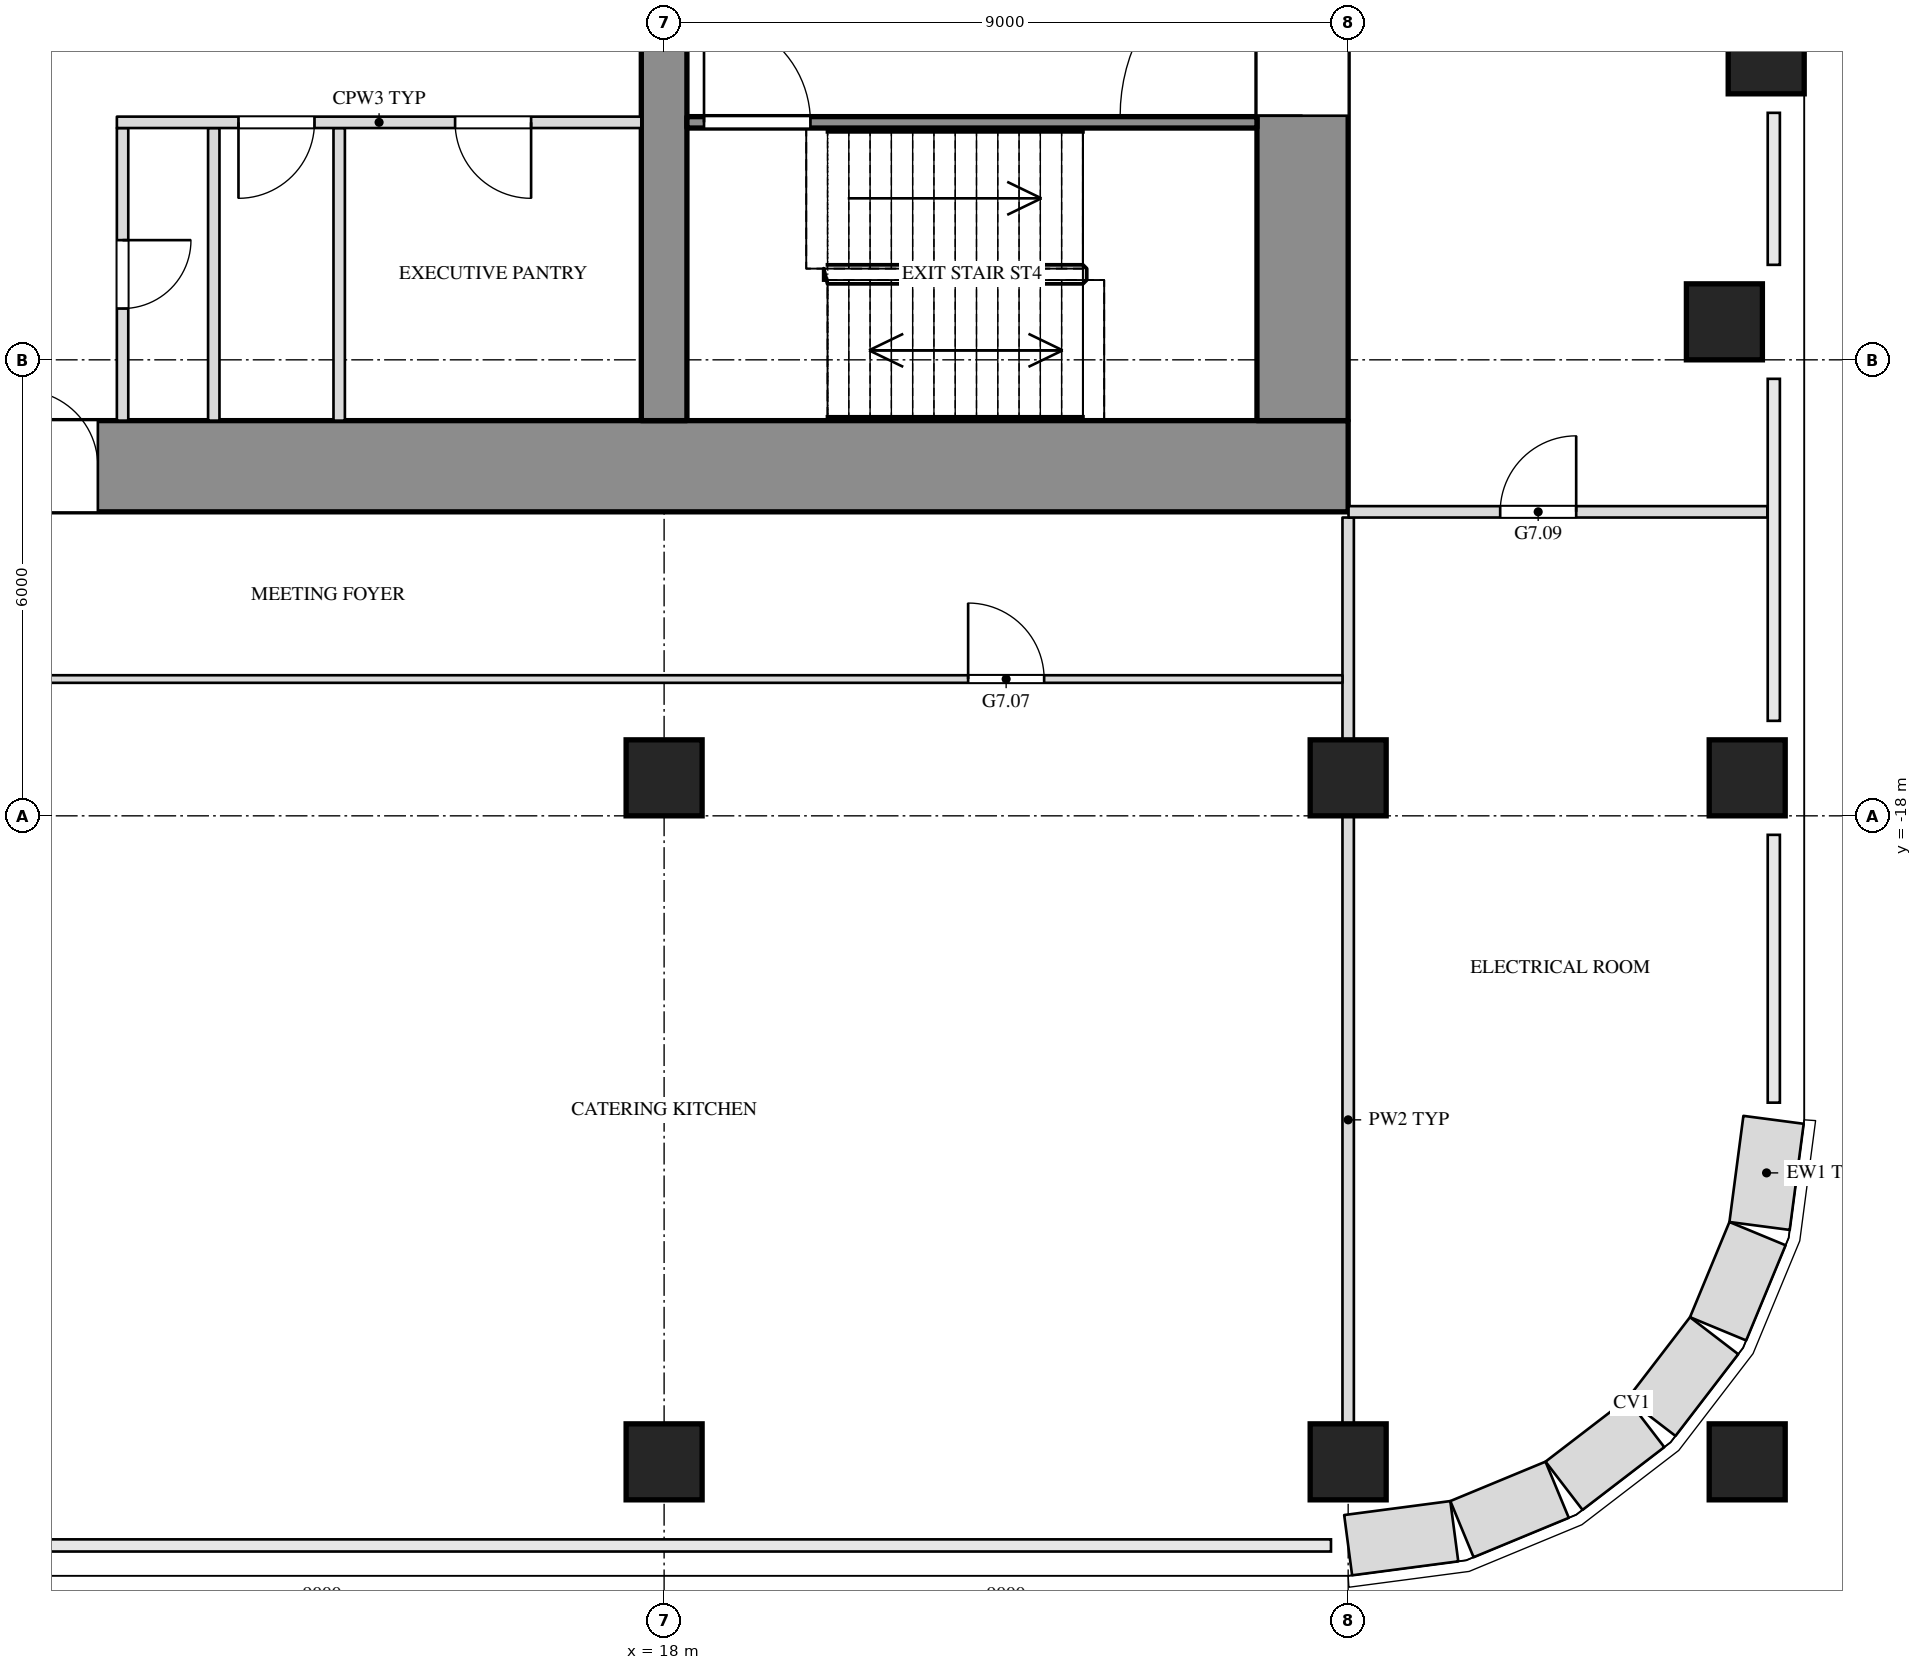
"""IFC4 building model, lengths in metres.
Left out: names, types, materials, properties, quantities, classifications, styles, units other than length and angle.
Written with IfcOpenShell. Run it as: python <this file> out.ifc"""

import sys

from ifc_helpers import new_model, si_unit, direction, frame, frame_2d, origin, origin_2d, place, context, subcontext, project, spatial, rectangle, extrude, element, fill, save


model = new_model("IFC4")
c1 = context("Model", 3, precision=1e-05, world=origin(), true_north=direction((0.0, 1.0)))
c2 = subcontext(c1, "Body", "Model", "MODEL_VIEW")
j1 = project(units=[si_unit("LENGTHUNIT", "METRE"), si_unit("PLANEANGLEUNIT", "RADIAN")], contexts=[c1])
p1 = place(None, origin())
s1 = spatial("IfcSite", under=j1, at=p1, CompositionType="ELEMENT")
p2 = place(p1, origin())
s2 = spatial("IfcBuilding", under=s1, at=p2, CompositionType="ELEMENT")
p3 = place(p2, frame((0.0, 0.0, 43.5)))
s3 = spatial("IfcBuildingStorey", under=s2, at=p3, CompositionType="ELEMENT", Elevation=43.5)
for number, where, z_axis, x_axis in (
    (1, (18.0, -26.5, 0.0), (0.0, 0.0, 1.0), (1.0, 0.0, 0.0)),
    (2, (27.0, -26.5, 0.0), (0.0, 0.0, 1.0), (1.0, 0.0, 0.0)),
    (3, (32.25, -26.5, 0.0), (0.0, 0.0, 1.0), (1.0, 0.0, 0.0)),
    (4, (18.0, -17.5, 0.0), (0.0, 0.0, 1.0), (1.0, 0.0, 0.0)),
    (5, (27.0, -17.5, 0.0), (0.0, 0.0, 1.0), (1.0, 0.0, 0.0)),
    (6, (32.25, -17.5, 0.0), (0.0, 0.0, 1.0), (1.0, 0.0, 0.0)),
    (7, (31.95, -11.5, 0.0), (0.0, 0.0, 1.0), (1.0, 0.0, 0.0)),
    (8, (32.5, -8.0, 0.0), (0.0, 0.0, 1.0), (1.0, 0.0, 0.0)),
):
    element("IfcColumn", number, at=place(p3, frame(where, z_axis=z_axis, x_axis=x_axis)), inside=s3, PredefinedType="COLUMN", context=c2, shape_type="SweptSolid", body=[
        extrude(rectangle(XDim=1.0, YDim=1.0, at=origin_2d()), origin(), (0.0, 0.0, 1.0), 4.5),
    ])
p4 = place(p3, frame((-27.0, -13.4, 0.0), z_axis=(0.0, 0.0, 1.0), x_axis=(1.0, 0.0, 0.0)))
e9 = element("IfcWall", 9, at=p4, inside=s3, PredefinedType="SHEAR", context=c2, shape_type="SweptSolid", body=[
    extrude(rectangle(XDim=54.0, YDim=1.2, at=frame_2d((27.0, 0.0))), origin(), (0.0, 0.0, 1.0), 4.25),
])
p5 = place(p4, frame((16.45, 0.0, 0.0)))
e10 = element("IfcOpeningElement", 10, at=p5, cuts=e9, PredefinedType="OPENING", context=c2, shape_type="SweptSolid", body=[
    extrude(rectangle(XDim=1.0, YDim=2.1, at=frame_2d((0.5, 1.05))), frame((0.0, 0.612, 0.0), z_axis=(0.0, -1.0, 0.0), x_axis=(1.0, 0.0, 0.0)), (0.0, 0.0, 1.0), 1.224),
])
p6 = place(p4, frame((36.55, 0.0, 0.0)))
e11 = element("IfcOpeningElement", 11, at=p6, cuts=e9, PredefinedType="OPENING", context=c2, shape_type="SweptSolid", body=[
    extrude(rectangle(XDim=1.0, YDim=2.1, at=frame_2d((0.5, 1.05))), frame((0.0, 0.612, 0.0), z_axis=(0.0, -1.0, 0.0), x_axis=(1.0, 0.0, 0.0)), (0.0, 0.0, 1.0), 1.224),
])
p7 = place(p3, frame((26.4, -12.8, 0.0), z_axis=(0.0, 0.0, 1.0), x_axis=(0.0, 1.0, 0.0)))
e12 = element("IfcWall", 12, at=p7, inside=s3, PredefinedType="SHEAR", context=c2, shape_type="SweptSolid", body=[
    extrude(rectangle(XDim=9.6, YDim=1.2, at=frame_2d((4.8, 0.0))), origin(), (0.0, 0.0, 1.0), 4.25),
])
p8 = place(p7, frame((4.012, 0.0, 0.0)))
e13 = element("IfcOpeningElement", 13, at=p8, cuts=e12, PredefinedType="OPENING", context=c2, shape_type="SweptSolid", body=[
    extrude(rectangle(XDim=2.4, YDim=2.1, at=frame_2d((1.2, 1.05))), frame((0.0, 0.612, 0.0), z_axis=(0.0, -1.0, 0.0), x_axis=(1.0, 0.0, 0.0)), (0.0, 0.0, 1.0), 1.224),
])
p9 = place(p3, frame((18.0, -12.8, 0.0), z_axis=(0.0, 0.0, 1.0), x_axis=(0.0, 1.0, 0.0)))
e14 = element("IfcWall", 14, at=p9, inside=s3, PredefinedType="SHEAR", context=c2, shape_type="SweptSolid", body=[
    extrude(rectangle(XDim=9.6, YDim=0.6, at=frame_2d((4.8, 0.0))), origin(), (0.0, 0.0, 1.0), 4.25),
])
p10 = place(p3, frame((27.0, -26.0, 0.0), z_axis=(0.0, 0.0, 1.0), x_axis=(0.0, 1.0, 0.0)))
e15 = element("IfcWall", 15, at=p10, inside=s3, PredefinedType="PARTITIONING", context=c2, shape_type="SweptSolid", body=[
    extrude(rectangle(XDim=8.0, YDim=0.15, at=frame_2d((4.0, 0.0))), origin(), (0.0, 0.0, 1.0), 3.638),
])
p11 = place(p3, frame((27.0, -17.0, 0.0), z_axis=(0.0, 0.0, 1.0), x_axis=(0.0, 1.0, 0.0)))
e16 = element("IfcWall", 16, at=p11, inside=s3, PredefinedType="PARTITIONING", context=c2, shape_type="SweptSolid", body=[
    extrude(rectangle(XDim=2.925, YDim=0.15, at=frame_2d((1.462, 0.0))), origin(), (0.0, 0.0, 1.0), 3.638),
])
p12 = place(p3, frame((8.9, -16.2, 0.0), z_axis=(0.0, 0.0, 1.0), x_axis=(1.0, 0.0, 0.0)))
e17 = element("IfcWall", 17, at=p12, inside=s3, PredefinedType="PARTITIONING", context=c2, shape_type="SweptSolid", body=[
    extrude(rectangle(XDim=18.025, YDim=0.1, at=frame_2d((9.013, 0.0))), origin(), (0.0, 0.0, 1.0), 4.25),
])
p13 = place(p12, frame((13.1, 0.0, 0.0)))
e18 = element("IfcOpeningElement", 18, at=p13, cuts=e17, PredefinedType="OPENING", context=c2, shape_type="SweptSolid", body=[
    extrude(rectangle(XDim=1.0, YDim=2.1, at=frame_2d((0.5, 1.05))), frame((0.0, 0.062, 0.0), z_axis=(0.0, -1.0, 0.0), x_axis=(1.0, 0.0, 0.0)), (0.0, 0.0, 1.0), 0.124),
])
p14 = place(p3, frame((27.005, -14.0, 0.0), z_axis=(0.0, 0.0, 1.0), x_axis=(1.0, 0.0, 0.0)))
e19 = element("IfcWall", 19, at=p14, inside=s3, PredefinedType="PARTITIONING", context=c2, shape_type="SweptSolid", body=[
    extrude(rectangle(XDim=5.511, YDim=0.15, at=frame_2d((2.756, 0.0))), origin(), (0.0, 0.0, 1.0), 4.25),
])
p15 = place(p14, frame((1.995, 0.0, 0.0)))
e20 = element("IfcOpeningElement", 20, at=p15, cuts=e19, PredefinedType="OPENING", context=c2, shape_type="SweptSolid", body=[
    extrude(rectangle(XDim=1.0, YDim=2.1, at=frame_2d((0.5, 1.05))), frame((0.0, 0.087, 0.0), z_axis=(0.0, -1.0, 0.0), x_axis=(1.0, 0.0, 0.0)), (0.0, 0.0, 1.0), 0.174),
])
p16 = place(p3, frame((27.0, -27.597, 0.0), z_axis=(0.0, 0.0, 1.0), x_axis=(0.99144603414, 0.130517283865, 0.0)))
e21 = element("IfcWall", 21, at=p16, inside=s3, PredefinedType="SOLIDWALL", context=c2, shape_type="SweptSolid", body=[
    extrude(rectangle(XDim=1.408, YDim=0.8, at=frame_2d((0.704, 0.0))), origin(), (0.0, 0.0, 1.0), 4.25),
])
p17 = place(p3, frame((28.497, -27.386, 0.0), z_axis=(0.0, 0.0, 1.0), x_axis=(0.923847774587, 0.38276009378, 0.0)))
e22 = element("IfcWall", 22, at=p17, inside=s3, PredefinedType="SOLIDWALL", context=c2, shape_type="SweptSolid", body=[
    extrude(rectangle(XDim=1.355, YDim=0.8, at=frame_2d((0.678, 0.0))), origin(), (0.0, 0.0, 1.0), 4.25),
])
for number, where, z_axis, x_axis in (
    (23, (29.84, -26.815, 0.0), (0.0, 0.0, 1.0), (0.793, 0.609, 0.0)),
    (24, (30.989, -25.916, 0.0), (0.0, 0.0, 1.0), (0.609, 0.793, 0.0)),
):
    element("IfcWall", number, at=place(p3, frame(where, z_axis=z_axis, x_axis=x_axis)), inside=s3, PredefinedType="SOLIDWALL", context=c2, shape_type="SweptSolid", body=[
        extrude(rectangle(XDim=1.356, YDim=0.8, at=frame_2d((0.678, 0.0))), origin(), (0.0, 0.0, 1.0), 4.25),
    ])
p18 = place(p3, frame((31.867, -24.75, 0.0), z_axis=(0.0, 0.0, 1.0), x_axis=(0.38276009378, 0.923847774587, 0.0)))
e25 = element("IfcWall", 25, at=p18, inside=s3, PredefinedType="SOLIDWALL", context=c2, shape_type="SweptSolid", body=[
    extrude(rectangle(XDim=1.355, YDim=0.8, at=frame_2d((0.678, 0.0))), origin(), (0.0, 0.0, 1.0), 4.25),
])
p19 = place(p3, frame((32.413, -23.396, 0.0), z_axis=(0.0, 0.0, 1.0), x_axis=(0.130517283865, 0.99144603414, 0.0)))
e26 = element("IfcWall", 26, at=p19, inside=s3, PredefinedType="SOLIDWALL", context=c2, shape_type="SweptSolid", body=[
    extrude(rectangle(XDim=1.408, YDim=0.8, at=frame_2d((0.704, 0.0))), origin(), (0.0, 0.0, 1.0), 4.25),
])
p20 = place(p3, frame((10.875, -12.8, 0.0), z_axis=(0.0, 0.0, 1.0), x_axis=(0.0, 1.0, 0.0)))
e27 = element("IfcWall", 27, at=p20, inside=s3, PredefinedType="PARTITIONING", context=c2, shape_type="SweptSolid", body=[
    extrude(rectangle(XDim=3.85, YDim=0.15, at=frame_2d((1.925, 0.0))), origin(), (0.0, 0.0, 1.0), 4.25),
])
p21 = place(p20, frame((1.475, 0.0, 0.0)))
e28 = element("IfcOpeningElement", 28, at=p21, cuts=e27, PredefinedType="OPENING", context=c2, shape_type="SweptSolid", body=[
    extrude(rectangle(XDim=0.9, YDim=2.1, at=frame_2d((0.45, 1.05))), frame((0.0, 0.087, 0.0), z_axis=(0.0, -1.0, 0.0), x_axis=(1.0, 0.0, 0.0)), (0.0, 0.0, 1.0), 0.174),
])
for number, where, z_axis, x_axis in (
    (29, (12.075, -12.8, 0.0), (0.0, 0.0, 1.0), (0.0, 1.0, 0.0)),
    (30, (13.725, -12.8, 0.0), (0.0, 0.0, 1.0), (0.0, 1.0, 0.0)),
):
    element("IfcWall", number, at=place(p3, frame(where, z_axis=z_axis, x_axis=x_axis)), inside=s3, PredefinedType="PARTITIONING", context=c2, shape_type="SweptSolid", body=[
        extrude(rectangle(XDim=3.85, YDim=0.15, at=frame_2d((1.925, 0.0))), origin(), (0.0, 0.0, 1.0), 4.25),
    ])
p22 = place(p3, frame((10.8, -8.875, 0.0), z_axis=(0.0, 0.0, 1.0), x_axis=(1.0, 0.0, 0.0)))
e31 = element("IfcWall", 31, at=p22, inside=s3, PredefinedType="PARTITIONING", context=c2, shape_type="SweptSolid", body=[
    extrude(rectangle(XDim=6.9, YDim=0.15, at=frame_2d((3.45, 0.0))), origin(), (0.0, 0.0, 1.0), 4.25),
])
p23 = place(p22, frame((1.6, 0.0, 0.0)))
e32 = element("IfcOpeningElement", 32, at=p23, cuts=e31, PredefinedType="OPENING", context=c2, shape_type="SweptSolid", body=[
    extrude(rectangle(XDim=1.0, YDim=2.1, at=frame_2d((0.5, 1.05))), frame((0.0, 0.087, 0.0), z_axis=(0.0, -1.0, 0.0), x_axis=(1.0, 0.0, 0.0)), (0.0, 0.0, 1.0), 0.174),
])
p24 = place(p22, frame((4.45, 0.0, 0.0)))
e33 = element("IfcOpeningElement", 33, at=p24, cuts=e31, PredefinedType="OPENING", context=c2, shape_type="SweptSolid", body=[
    extrude(rectangle(XDim=1.0, YDim=2.1, at=frame_2d((0.5, 1.05))), frame((0.0, 0.087, 0.0), z_axis=(0.0, -1.0, 0.0), x_axis=(1.0, 0.0, 0.0)), (0.0, 0.0, 1.0), 0.174),
])
p25 = place(p3, frame((18.3, -8.875, 0.0), z_axis=(0.0, 0.0, 1.0), x_axis=(1.0, 0.0, 0.0)))
e34 = element("IfcWall", 34, at=p25, inside=s3, PredefinedType="SHEAR", context=c2, shape_type="SweptSolid", body=[
    extrude(rectangle(XDim=7.5, YDim=0.15, at=frame_2d((3.75, 0.0))), origin(), (0.0, 0.0, 1.0), 4.25),
])
p26 = place(p25, frame((0.225, 0.0, 0.0)))
e35 = element("IfcOpeningElement", 35, at=p26, cuts=e34, PredefinedType="OPENING", context=c2, shape_type="SweptSolid", body=[
    extrude(rectangle(XDim=1.4, YDim=2.1, at=frame_2d((0.7, 1.05))), frame((0.0, 0.087, 0.0), z_axis=(0.0, -1.0, 0.0), x_axis=(1.0, 0.0, 0.0)), (0.0, 0.0, 1.0), 0.174),
])
p27 = place(p13, origin())
e36 = element("IfcDoor", 36, at=p27, inside=s3, OperationType="SINGLE_SWING_LEFT", PredefinedType="DOOR", context=c2, shape_type="SweptSolid", body=[
    extrude(rectangle(XDim=1.0, YDim=2.1, at=frame_2d((0.5, 1.05))), frame((0.0, 0.025, 0.0), z_axis=(0.0, -1.0, 0.0), x_axis=(1.0, 0.0, 0.0)), (0.0, 0.0, 1.0), 0.05),
])
fill(e18, e36)
p28 = place(p15, origin())
e37 = element("IfcDoor", 37, at=p28, inside=s3, OperationType="SINGLE_SWING_RIGHT", PredefinedType="DOOR", context=c2, shape_type="SweptSolid", body=[
    extrude(rectangle(XDim=1.0, YDim=2.1, at=frame_2d((0.5, 1.05))), frame((0.0, 0.025, 0.0), z_axis=(0.0, -1.0, 0.0), x_axis=(1.0, 0.0, 0.0)), (0.0, 0.0, 1.0), 0.05),
])
fill(e20, e37)
p29 = place(p6, origin())
e38 = element("IfcDoor", 38, at=p29, inside=s3, OperationType="SINGLE_SWING_LEFT", PredefinedType="DOOR", context=c2, shape_type="SweptSolid", body=[
    extrude(rectangle(XDim=1.0, YDim=2.1, at=frame_2d((0.5, 1.05))), frame((0.0, 0.025, 0.0), z_axis=(0.0, -1.0, 0.0), x_axis=(1.0, 0.0, 0.0)), (0.0, 0.0, 1.0), 0.05),
])
fill(e11, e38)
p30 = place(p21, origin())
e39 = element("IfcDoor", 39, at=p30, inside=s3, OperationType="SINGLE_SWING_LEFT", PredefinedType="DOOR", context=c2, shape_type="SweptSolid", body=[
    extrude(rectangle(XDim=0.9, YDim=2.1, at=frame_2d((0.45, 1.05))), frame((0.0, 0.025, 0.0), z_axis=(0.0, -1.0, 0.0), x_axis=(1.0, 0.0, 0.0)), (0.0, 0.0, 1.0), 0.05),
])
fill(e28, e39)
p31 = place(p23, origin())
e40 = element("IfcDoor", 40, at=p31, inside=s3, OperationType="SINGLE_SWING_RIGHT", PredefinedType="DOOR", context=c2, shape_type="SweptSolid", body=[
    extrude(rectangle(XDim=1.0, YDim=2.1, at=frame_2d((0.5, 1.05))), frame((0.0, 0.025, 0.0), z_axis=(0.0, -1.0, 0.0), x_axis=(1.0, 0.0, 0.0)), (0.0, 0.0, 1.0), 0.05),
])
fill(e32, e40)
p32 = place(p24, origin())
e41 = element("IfcDoor", 41, at=p32, inside=s3, OperationType="SINGLE_SWING_LEFT", PredefinedType="DOOR", context=c2, shape_type="SweptSolid", body=[
    extrude(rectangle(XDim=1.0, YDim=2.1, at=frame_2d((0.5, 1.05))), frame((0.0, 0.025, 0.0), z_axis=(0.0, -1.0, 0.0), x_axis=(1.0, 0.0, 0.0)), (0.0, 0.0, 1.0), 0.05),
])
fill(e33, e41)
p33 = place(p26, origin())
e42 = element("IfcDoor", 42, at=p33, inside=s3, OperationType="DOUBLE_DOOR_SINGLE_SWING", PredefinedType="DOOR", context=c2, shape_type="SweptSolid", body=[
    extrude(rectangle(XDim=1.4, YDim=2.1, at=frame_2d((0.7, 1.05))), frame((0.0, 0.025, 0.0), z_axis=(0.0, -1.0, 0.0), x_axis=(1.0, 0.0, 0.0)), (0.0, 0.0, 1.0), 0.05),
])
fill(e35, e42)
p34 = place(p8, origin())
e43 = element("IfcDoor", 43, at=p34, inside=s3, OperationType="DOUBLE_DOOR_SINGLE_SWING", PredefinedType="DOOR", context=c2, shape_type="SweptSolid", body=[
    extrude(rectangle(XDim=2.4, YDim=2.1, at=frame_2d((1.2, 1.05))), frame((0.0, 0.025, 0.0), z_axis=(0.0, -1.0, 0.0), x_axis=(1.0, 0.0, 0.0)), (0.0, 0.0, 1.0), 0.05),
])
fill(e13, e43)
save(model, sys.argv[1])
